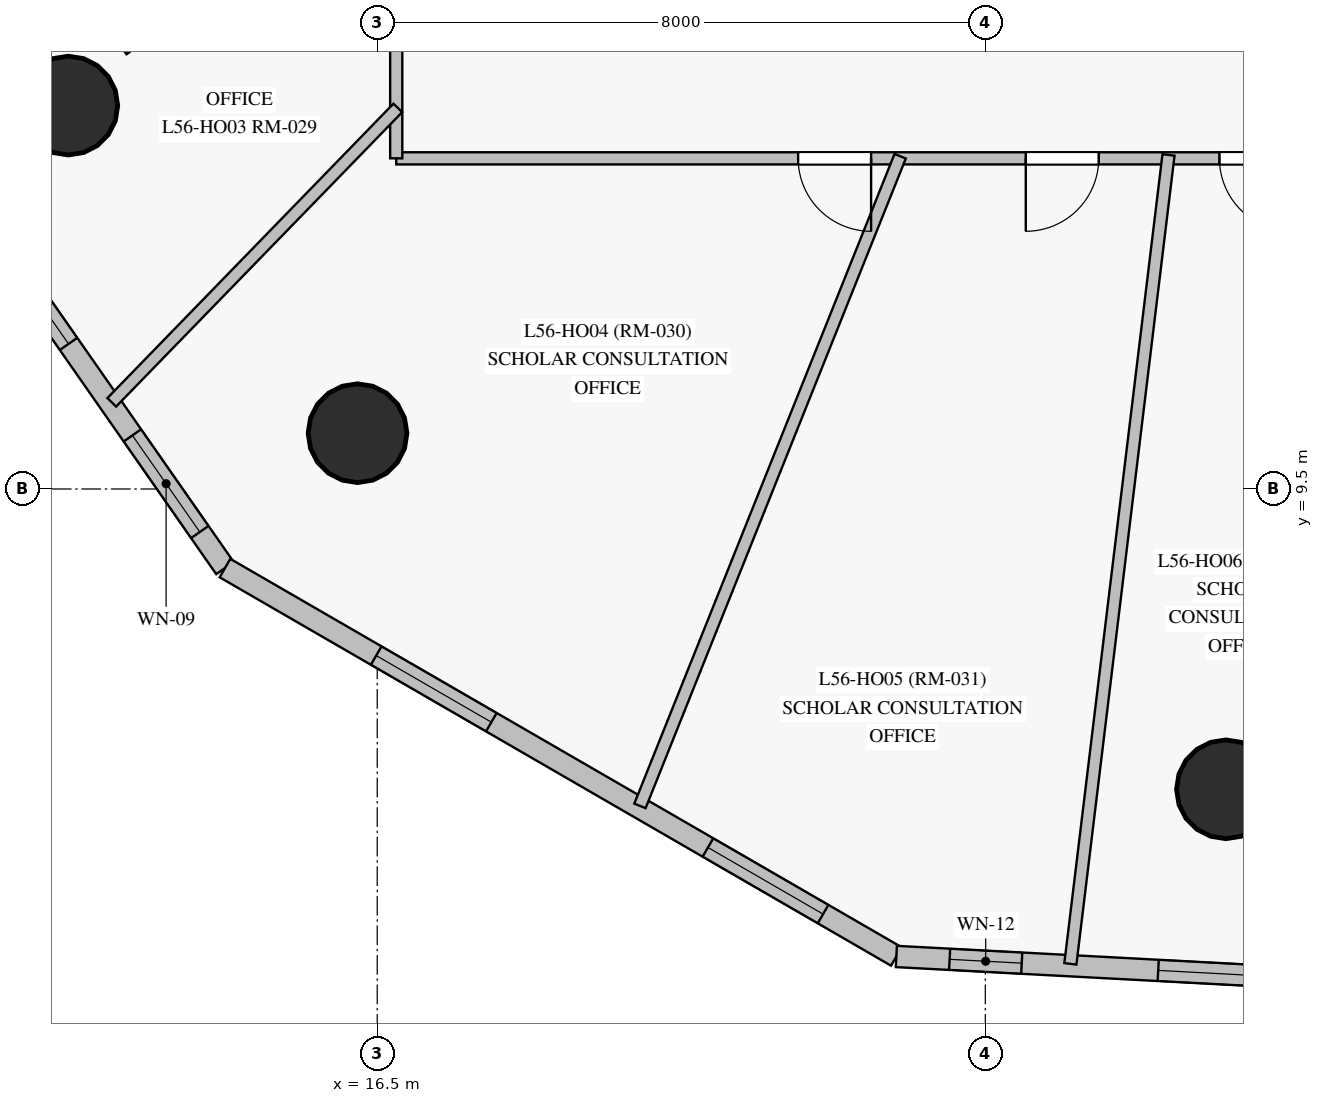
"""IFC4 building model, lengths in metres.
Left out: names, types, materials, properties, quantities, classifications, styles, units other than length and angle.
Written with IfcOpenShell. Run it as: python <this file> out.ifc"""

import sys

from ifc_helpers import new_model, si_unit, direction, frame, frame_2d, origin, origin_with_axes, origin_2d, place, context, subcontext, project, spatial, rectangle, circle, extrude, source, transform, mapped, element, fill, save


model = new_model("IFC4")
c1 = context("Model", 3, precision=1e-05, world=origin(), true_north=direction((0.0, 1.0)))
c2 = subcontext(c1, "Body", "Model", "MODEL_VIEW")
j1 = project(units=[si_unit("LENGTHUNIT", "METRE"), si_unit("PLANEANGLEUNIT", "RADIAN")], contexts=[c1])
p1 = place(None, origin())
s1 = spatial("IfcSite", under=j1, at=p1, CompositionType="ELEMENT")
p2 = place(p1, origin())
s2 = spatial("IfcBuilding", under=s1, at=p2, CompositionType="ELEMENT")
p3 = place(p2, frame((0.0, 0.0, 193.15)))
s3 = spatial("IfcBuildingStorey", under=s2, at=p3, CompositionType="ELEMENT", Elevation=193.15)
m1 = source(origin_with_axes(), c2, "Body", "SweptSolid", [
    extrude(circle(Radius=0.65, at=origin_2d()), origin(), (0.0, 0.0, 1.0), 3.05),
])
for number, where, z_axis, x_axis in (
    (1, (12.436, 14.544, 0.0), (0.0, 0.0, 1.0), (1.0, 0.0, 0.0)),
    (2, (16.241, 10.234, 0.0), (0.0, 0.0, 1.0), (1.0, 0.0, 0.0)),
    (3, (27.666, 5.549, 0.0), (0.0, 0.0, 1.0), (1.0, 0.0, 0.0)),
):
    element("IfcColumn", number, at=place(p3, frame(where, z_axis=z_axis, x_axis=x_axis)), inside=s3, PredefinedType="COLUMN", context=c2, shape_type="MappedRepresentation", body=[
        mapped(m1, transform((0.0, 0.0, 0.0), scale=1.0)),
    ])
p4 = place(p3, frame((6.43, 20.02, 0.0), z_axis=(0.0, 0.0, 1.0), x_axis=(0.57226340273, -0.820069873789, 0.0)))
e4 = element("IfcWall", 4, at=p4, inside=s3, PredefinedType="SOLIDWALL", context=c2, shape_type="SweptSolid", body=[
    extrude(rectangle(XDim=14.097, YDim=0.28, at=frame_2d((7.049, 0.0))), origin(), (0.0, 0.0, 1.0), 2.825),
])
p5 = place(p4, frame((0.797, 0.0, 0.85)))
e5 = element("IfcOpeningElement", 5, at=p5, cuts=e4, PredefinedType="OPENING", context=c2, shape_type="SweptSolid", body=[
    extrude(rectangle(XDim=1.75, YDim=1.65, at=frame_2d((0.875, 0.825))), frame((0.0, 0.15, 0.0), z_axis=(0.0, -1.0, 0.0), x_axis=(1.0, 0.0, 0.0)), (0.0, 0.0, 1.0), 0.3),
])
p6 = place(p4, frame((4.668, 0.0, 0.85)))
e6 = element("IfcOpeningElement", 6, at=p6, cuts=e4, PredefinedType="OPENING", context=c2, shape_type="SweptSolid", body=[
    extrude(rectangle(XDim=1.75, YDim=1.65, at=frame_2d((0.875, 0.825))), frame((0.0, 0.15, 0.0), z_axis=(0.0, -1.0, 0.0), x_axis=(1.0, 0.0, 0.0)), (0.0, 0.0, 1.0), 0.3),
])
p7 = place(p4, frame((8.751, 0.0, 0.85)))
e7 = element("IfcOpeningElement", 7, at=p7, cuts=e4, PredefinedType="OPENING", context=c2, shape_type="SweptSolid", body=[
    extrude(rectangle(XDim=1.75, YDim=1.65, at=frame_2d((0.875, 0.825))), frame((0.0, 0.15, 0.0), z_axis=(0.0, -1.0, 0.0), x_axis=(1.0, 0.0, 0.0)), (0.0, 0.0, 1.0), 0.3),
])
p8 = place(p4, frame((11.969, 0.0, 0.85)))
e8 = element("IfcOpeningElement", 8, at=p8, cuts=e4, PredefinedType="OPENING", context=c2, shape_type="SweptSolid", body=[
    extrude(rectangle(XDim=1.55, YDim=1.65, at=frame_2d((0.775, 0.825))), frame((0.0, 0.15, 0.0), z_axis=(0.0, -1.0, 0.0), x_axis=(1.0, 0.0, 0.0)), (0.0, 0.0, 1.0), 0.3),
])
p9 = place(p3, frame((14.497, 8.459, 0.0), z_axis=(0.0, 0.0, 1.0), x_axis=(0.865589496706, -0.500754254293, 0.0)))
e9 = element("IfcWall", 9, at=p9, inside=s3, PredefinedType="SOLIDWALL", context=c2, shape_type="SweptSolid", body=[
    extrude(rectangle(XDim=10.204, YDim=0.28, at=frame_2d((5.102, 0.0))), origin(), (0.0, 0.0, 1.0), 2.825),
])
p10 = place(p9, frame((2.299, 0.0, 0.85)))
e10 = element("IfcOpeningElement", 10, at=p10, cuts=e9, PredefinedType="OPENING", context=c2, shape_type="SweptSolid", body=[
    extrude(rectangle(XDim=1.75, YDim=1.65, at=frame_2d((0.875, 0.825))), frame((0.0, 0.15, 0.0), z_axis=(0.0, -1.0, 0.0), x_axis=(1.0, 0.0, 0.0)), (0.0, 0.0, 1.0), 0.3),
])
p11 = place(p9, frame((7.341, 0.0, 0.85)))
e11 = element("IfcOpeningElement", 11, at=p11, cuts=e9, PredefinedType="OPENING", context=c2, shape_type="SweptSolid", body=[
    extrude(rectangle(XDim=1.75, YDim=1.65, at=frame_2d((0.875, 0.825))), frame((0.0, 0.15, 0.0), z_axis=(0.0, -1.0, 0.0), x_axis=(1.0, 0.0, 0.0)), (0.0, 0.0, 1.0), 0.3),
])
p12 = place(p3, frame((23.33, 3.35, 0.0), z_axis=(0.0, 0.0, 1.0), x_axis=(0.998588579162, -0.053111670719, 0.0)))
e12 = element("IfcWall", 12, at=p12, inside=s3, PredefinedType="SOLIDWALL", context=c2, shape_type="SweptSolid", body=[
    extrude(rectangle(XDim=13.142, YDim=0.28, at=frame_2d((6.571, 0.0))), origin(), (0.0, 0.0, 1.0), 2.825),
])
p13 = place(p12, frame((0.702, 0.0, 0.85)))
e13 = element("IfcOpeningElement", 13, at=p13, cuts=e12, PredefinedType="OPENING", context=c2, shape_type="SweptSolid", body=[
    extrude(rectangle(XDim=0.95, YDim=1.5, at=frame_2d((0.475, 0.75))), frame((0.0, 0.15, 0.0), z_axis=(0.0, -1.0, 0.0), x_axis=(1.0, 0.0, 0.0)), (0.0, 0.0, 1.0), 0.3),
])
p14 = place(p12, frame((3.45, 0.0, 0.85)))
e14 = element("IfcOpeningElement", 14, at=p14, cuts=e12, PredefinedType="OPENING", context=c2, shape_type="SweptSolid", body=[
    extrude(rectangle(XDim=1.75, YDim=1.65, at=frame_2d((0.875, 0.825))), frame((0.0, 0.15, 0.0), z_axis=(0.0, -1.0, 0.0), x_axis=(1.0, 0.0, 0.0)), (0.0, 0.0, 1.0), 0.3),
])
p15 = place(p12, frame((7.55, 0.0, 0.85)))
e15 = element("IfcOpeningElement", 15, at=p15, cuts=e12, PredefinedType="OPENING", context=c2, shape_type="SweptSolid", body=[
    extrude(rectangle(XDim=1.75, YDim=1.65, at=frame_2d((0.875, 0.825))), frame((0.0, 0.15, 0.0), z_axis=(0.0, -1.0, 0.0), x_axis=(1.0, 0.0, 0.0)), (0.0, 0.0, 1.0), 0.3),
])
p16 = place(p12, frame((10.979, 0.0, 0.85)))
e16 = element("IfcOpeningElement", 16, at=p16, cuts=e12, PredefinedType="OPENING", context=c2, shape_type="SweptSolid", body=[
    extrude(rectangle(XDim=0.95, YDim=1.5, at=frame_2d((0.475, 0.75))), frame((0.0, 0.15, 0.0), z_axis=(0.0, -1.0, 0.0), x_axis=(1.0, 0.0, 0.0)), (0.0, 0.0, 1.0), 0.3),
])
p17 = place(p3, frame((41.8, 13.85, 0.0), z_axis=(0.0, 0.0, 1.0), x_axis=(-1.0, 0.0, 0.0)))
e17 = element("IfcWall", 17, at=p17, inside=s3, PredefinedType="PARTITIONING", context=c2, shape_type="SweptSolid", body=[
    extrude(rectangle(XDim=25.05, YDim=0.16, at=frame_2d((12.525, 0.0))), origin(), (0.0, 0.0, 1.0), 2.275),
])
p18 = place(p17, frame((5.788, 0.0, 0.0)))
e18 = element("IfcOpeningElement", 18, at=p18, cuts=e17, PredefinedType="OPENING", context=c2, shape_type="SweptSolid", body=[
    extrude(rectangle(XDim=0.96, YDim=2.15, at=frame_2d((0.48, 1.075))), frame((0.0, 0.09, 0.0), z_axis=(0.0, -1.0, 0.0), x_axis=(1.0, 0.0, 0.0)), (0.0, 0.0, 1.0), 0.18),
])
p19 = place(p17, frame((18.802, 0.0, 0.0)))
e19 = element("IfcOpeningElement", 19, at=p19, cuts=e17, PredefinedType="OPENING", context=c2, shape_type="SweptSolid", body=[
    extrude(rectangle(XDim=0.96, YDim=2.15, at=frame_2d((0.48, 1.075))), frame((0.0, 0.09, 0.0), z_axis=(0.0, -1.0, 0.0), x_axis=(1.0, 0.0, 0.0)), (0.0, 0.0, 1.0), 0.18),
])
p20 = place(p17, frame((15.808, 0.0, 0.0)))
e20 = element("IfcOpeningElement", 20, at=p20, cuts=e17, PredefinedType="OPENING", context=c2, shape_type="SweptSolid", body=[
    extrude(rectangle(XDim=0.96, YDim=2.15, at=frame_2d((0.48, 1.075))), frame((0.0, 0.09, 0.0), z_axis=(0.0, -1.0, 0.0), x_axis=(1.0, 0.0, 0.0)), (0.0, 0.0, 1.0), 0.18),
])
p21 = place(p17, frame((13.26, 0.0, 0.0)))
e21 = element("IfcOpeningElement", 21, at=p21, cuts=e17, PredefinedType="OPENING", context=c2, shape_type="SweptSolid", body=[
    extrude(rectangle(XDim=0.96, YDim=2.15, at=frame_2d((0.48, 1.075))), frame((0.0, 0.09, 0.0), z_axis=(0.0, -1.0, 0.0), x_axis=(1.0, 0.0, 0.0)), (0.0, 0.0, 1.0), 0.18),
])
p22 = place(p17, frame((11.46, 0.0, 0.0)))
e22 = element("IfcOpeningElement", 22, at=p22, cuts=e17, PredefinedType="OPENING", context=c2, shape_type="SweptSolid", body=[
    extrude(rectangle(XDim=0.96, YDim=2.15, at=frame_2d((0.48, 1.075))), frame((0.0, 0.09, 0.0), z_axis=(0.0, -1.0, 0.0), x_axis=(1.0, 0.0, 0.0)), (0.0, 0.0, 1.0), 0.18),
])
p23 = place(p17, frame((8.202, 0.0, 0.0)))
e23 = element("IfcOpeningElement", 23, at=p23, cuts=e17, PredefinedType="OPENING", context=c2, shape_type="SweptSolid", body=[
    extrude(rectangle(XDim=0.96, YDim=2.15, at=frame_2d((0.48, 1.075))), frame((0.0, 0.09, 0.0), z_axis=(0.0, -1.0, 0.0), x_axis=(1.0, 0.0, 0.0)), (0.0, 0.0, 1.0), 0.18),
])
p24 = place(p3, frame((16.75, 13.85, 0.0), z_axis=(0.0, 0.0, 1.0), x_axis=(0.0, 1.0, 0.0)))
e24 = element("IfcWall", 24, at=p24, inside=s3, PredefinedType="PARTITIONING", context=c2, shape_type="SweptSolid", body=[
    extrude(rectangle(XDim=17.8, YDim=0.16, at=frame_2d((8.9, 0.0))), origin(), (0.0, 0.0, 1.0), 2.375),
])
p25 = place(p24, frame((12.965, 0.0, 0.0)))
e25 = element("IfcOpeningElement", 25, at=p25, cuts=e24, PredefinedType="OPENING", context=c2, shape_type="SweptSolid", body=[
    extrude(rectangle(XDim=0.96, YDim=2.15, at=frame_2d((0.48, 1.075))), frame((0.0, 0.09, 0.0), z_axis=(0.0, -1.0, 0.0), x_axis=(1.0, 0.0, 0.0)), (0.0, 0.0, 1.0), 0.18),
])
p26 = place(p24, frame((11.095, 0.0, 0.0)))
e26 = element("IfcOpeningElement", 26, at=p26, cuts=e24, PredefinedType="OPENING", context=c2, shape_type="SweptSolid", body=[
    extrude(rectangle(XDim=0.96, YDim=2.15, at=frame_2d((0.48, 1.075))), frame((0.0, 0.09, 0.0), z_axis=(0.0, -1.0, 0.0), x_axis=(1.0, 0.0, 0.0)), (0.0, 0.0, 1.0), 0.18),
])
p27 = place(p24, frame((8.425, 0.0, 0.0)))
e27 = element("IfcOpeningElement", 27, at=p27, cuts=e24, PredefinedType="OPENING", context=c2, shape_type="SweptSolid", body=[
    extrude(rectangle(XDim=0.96, YDim=2.15, at=frame_2d((0.48, 1.075))), frame((0.0, 0.09, 0.0), z_axis=(0.0, -1.0, 0.0), x_axis=(1.0, 0.0, 0.0)), (0.0, 0.0, 1.0), 0.18),
])
p28 = place(p24, frame((5.755, 0.0, 0.0)))
e28 = element("IfcOpeningElement", 28, at=p28, cuts=e24, PredefinedType="OPENING", context=c2, shape_type="SweptSolid", body=[
    extrude(rectangle(XDim=0.96, YDim=2.15, at=frame_2d((0.48, 1.075))), frame((0.0, 0.09, 0.0), z_axis=(0.0, -1.0, 0.0), x_axis=(1.0, 0.0, 0.0)), (0.0, 0.0, 1.0), 0.18),
])
p29 = place(p24, frame((1.74, 0.0, 0.0)))
e29 = element("IfcOpeningElement", 29, at=p29, cuts=e24, PredefinedType="OPENING", context=c2, shape_type="SweptSolid", body=[
    extrude(rectangle(XDim=0.96, YDim=2.15, at=frame_2d((0.48, 1.075))), frame((0.0, 0.09, 0.0), z_axis=(0.0, -1.0, 0.0), x_axis=(1.0, 0.0, 0.0)), (0.0, 0.0, 1.0), 0.18),
])
p30 = place(p3, frame((26.91, 13.895, 0.0), z_axis=(0.0, 0.0, 1.0), x_axis=(-0.120454472702, -0.992718852448, 0.0)))
e30 = element("IfcWall", 30, at=p30, inside=s3, PredefinedType="PARTITIONING", context=c2, shape_type="SweptSolid", body=[
    extrude(rectangle(XDim=10.72, YDim=0.16, at=frame_2d((5.36, 0.0))), origin(), (0.0, 0.0, 1.0), 2.275),
])
p31 = place(p3, frame((23.38, 13.878, 0.0), z_axis=(0.0, 0.0, 1.0), x_axis=(-0.371843244329, -0.928295535725, 0.0)))
e31 = element("IfcWall", 31, at=p31, inside=s3, PredefinedType="PARTITIONING", context=c2, shape_type="SweptSolid", body=[
    extrude(rectangle(XDim=9.207, YDim=0.16, at=frame_2d((4.604, 0.0))), origin(), (0.0, 0.0, 1.0), 2.825),
])
p32 = place(p3, frame((16.771, 14.514, 0.0), z_axis=(0.0, 0.0, 1.0), x_axis=(-0.696840168134, -0.717226449648, 0.0)))
e32 = element("IfcWall", 32, at=p32, inside=s3, PredefinedType="PARTITIONING", context=c2, shape_type="SweptSolid", body=[
    extrude(rectangle(XDim=5.401, YDim=0.16, at=frame_2d((2.701, 0.0))), origin(), (0.0, 0.0, 1.0), 2.825),
])
p33 = place(p3, frame((16.774, 17.947, 0.0), z_axis=(0.0, 0.0, 1.0), x_axis=(-0.805443512659, -0.592672546956, 0.0)))
e33 = element("IfcWall", 33, at=p33, inside=s3, PredefinedType="PARTITIONING", context=c2, shape_type="SweptSolid", body=[
    extrude(rectangle(XDim=4.493, YDim=0.16, at=frame_2d((2.247, 0.0))), origin(), (0.0, 0.0, 1.0), 2.275),
])
m2 = source(origin_with_axes(), c2, "Body", "SweptSolid", [
    extrude(rectangle(XDim=1.75, YDim=1.65, at=frame_2d((0.875, 0.825))), frame((0.0, 0.03, 0.0), z_axis=(0.0, -1.0, 0.0), x_axis=(1.0, 0.0, 0.0)), (0.0, 0.0, 1.0), 0.06),
])
p34 = place(p7, origin())
e34 = element("IfcWindow", 34, at=p34, inside=s3, PartitioningType="SINGLE_PANEL", PredefinedType="WINDOW", context=c2, shape_type="MappedRepresentation", body=[
    mapped(m2, transform((0.0, 0.0, 0.0), scale=1.0)),
])
fill(e7, e34)
m3 = source(origin_with_axes(), c2, "Body", "SweptSolid", [
    extrude(rectangle(XDim=1.55, YDim=1.65, at=frame_2d((0.775, 0.825))), frame((0.0, 0.03, 0.0), z_axis=(0.0, -1.0, 0.0), x_axis=(1.0, 0.0, 0.0)), (0.0, 0.0, 1.0), 0.06),
])
p35 = place(p8, origin())
e35 = element("IfcWindow", 35, at=p35, inside=s3, PartitioningType="SINGLE_PANEL", PredefinedType="WINDOW", context=c2, shape_type="MappedRepresentation", body=[
    mapped(m3, transform((0.0, 0.0, 0.0), scale=1.0)),
])
fill(e8, e35)
p36 = place(p10, origin())
e36 = element("IfcWindow", 36, at=p36, inside=s3, PartitioningType="SINGLE_PANEL", PredefinedType="WINDOW", context=c2, shape_type="MappedRepresentation", body=[
    mapped(m2, transform((0.0, 0.0, 0.0), scale=1.0)),
])
fill(e10, e36)
p37 = place(p11, origin())
e37 = element("IfcWindow", 37, at=p37, inside=s3, PartitioningType="SINGLE_PANEL", PredefinedType="WINDOW", context=c2, shape_type="MappedRepresentation", body=[
    mapped(m2, transform((0.0, 0.0, 0.0), scale=1.0)),
])
fill(e11, e37)
m4 = source(origin_with_axes(), c2, "Body", "SweptSolid", [
    extrude(rectangle(XDim=0.95, YDim=1.5, at=frame_2d((0.475, 0.75))), frame((0.0, 0.03, 0.0), z_axis=(0.0, -1.0, 0.0), x_axis=(1.0, 0.0, 0.0)), (0.0, 0.0, 1.0), 0.06),
])
p38 = place(p13, origin())
e38 = element("IfcWindow", 38, at=p38, inside=s3, PartitioningType="SINGLE_PANEL", PredefinedType="WINDOW", context=c2, shape_type="MappedRepresentation", body=[
    mapped(m4, transform((0.0, 0.0, 0.0), scale=1.0)),
])
fill(e13, e38)
p39 = place(p14, origin())
e39 = element("IfcWindow", 39, at=p39, inside=s3, PartitioningType="SINGLE_PANEL", PredefinedType="WINDOW", context=c2, shape_type="MappedRepresentation", body=[
    mapped(m2, transform((0.0, 0.0, 0.0), scale=1.0)),
])
fill(e14, e39)
m5 = source(origin_with_axes(), c2, "Body", "SweptSolid", [
    extrude(rectangle(XDim=0.96, YDim=2.15, at=frame_2d((0.48, 1.075))), frame((0.0, 0.025, 0.0), z_axis=(0.0, -1.0, 0.0), x_axis=(1.0, 0.0, 0.0)), (0.0, 0.0, 1.0), 0.05),
])
p40 = place(p19, origin())
e40 = element("IfcDoor", 40, at=p40, inside=s3, OperationType="SINGLE_SWING_LEFT", PredefinedType="DOOR", context=c2, shape_type="MappedRepresentation", body=[
    mapped(m5, transform((0.0, 0.0, 0.0), scale=1.0)),
])
fill(e19, e40)
p41 = place(p20, origin())
e41 = element("IfcDoor", 41, at=p41, inside=s3, OperationType="SINGLE_SWING_RIGHT", PredefinedType="DOOR", context=c2, shape_type="MappedRepresentation", body=[
    mapped(m5, transform((0.0, 0.0, 0.0), scale=1.0)),
])
fill(e20, e41)
p42 = place(p21, origin())
e42 = element("IfcDoor", 42, at=p42, inside=s3, OperationType="SINGLE_SWING_LEFT", PredefinedType="DOOR", context=c2, shape_type="MappedRepresentation", body=[
    mapped(m5, transform((0.0, 0.0, 0.0), scale=1.0)),
])
fill(e21, e42)
save(model, sys.argv[1])
